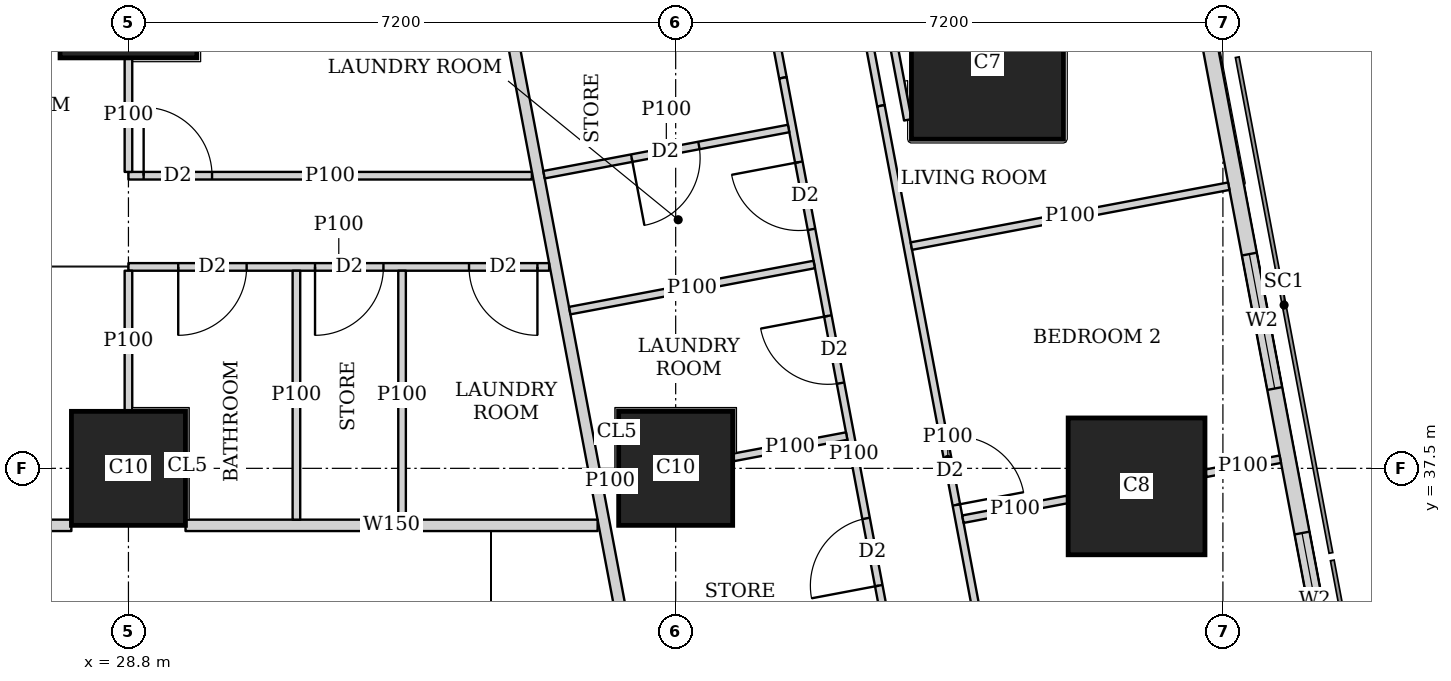
"""IFC4 building model, lengths in metres.
Left out: names, types, materials, properties, quantities, classifications, styles, units other than length and angle.
Written with IfcOpenShell. Run it as: python <this file> out.ifc"""

import sys

from ifc_helpers import new_model, si_unit, direction, frame, frame_2d, origin, origin_2d, place, context, subcontext, project, spatial, rectangle, extrude, element, fill, save


model = new_model("IFC4")
c1 = context("Model", 3, precision=1e-05, world=origin(), true_north=direction((0.0, 1.0)))
c2 = subcontext(c1, "Body", "Model", "MODEL_VIEW")
j1 = project(units=[si_unit("LENGTHUNIT", "METRE"), si_unit("PLANEANGLEUNIT", "RADIAN")], contexts=[c1])
p1 = place(None, origin())
s1 = spatial("IfcSite", under=j1, at=p1, CompositionType="ELEMENT")
p2 = place(p1, origin())
s2 = spatial("IfcBuilding", under=s1, at=p2, CompositionType="ELEMENT")
p3 = place(p2, frame((0.0, 0.0, 147.05)))
s3 = spatial("IfcBuildingStorey", under=s2, at=p3, CompositionType="ELEMENT", Elevation=147.05)
for number, where, z_axis, x_axis in (
    (1, (28.8, 37.5, 0.0), (0.0, 0.0, 1.0), (1.0, 0.0, 0.0)),
    (2, (36.0, 37.5, 0.0), (0.0, 0.0, 1.0), (1.0, 0.0, 0.0)),
):
    element("IfcColumn", number, at=place(p3, frame(where, z_axis=z_axis, x_axis=x_axis)), inside=s3, PredefinedType="COLUMN", context=c2, shape_type="SweptSolid", body=[
        extrude(rectangle(XDim=1.5, YDim=1.5, at=origin_2d()), origin(), (0.0, 0.0, 1.0), 3.75),
    ])
p4 = place(p3, frame((42.064, 37.263, 0.0), z_axis=(0.0, 0.0, 1.0), x_axis=(1.0, 0.0, 0.0)))
e3 = element("IfcColumn", 3, at=p4, inside=s3, PredefinedType="COLUMN", context=c2, shape_type="SweptSolid", body=[
    extrude(rectangle(XDim=1.8, YDim=1.8, at=origin_2d()), origin(), (0.0, 0.0, 1.0), 3.75),
])
p5 = place(p3, frame((40.102, 42.83, 0.0), z_axis=(0.0, 0.0, 1.0), x_axis=(1.0, 0.0, 0.0)))
e4 = element("IfcColumn", 4, at=p5, inside=s3, PredefinedType="COLUMN", context=c2, shape_type="SweptSolid", body=[
    extrude(rectangle(XDim=2.0, YDim=2.0, at=origin_2d()), origin(), (0.0, 0.0, 1.0), 3.75),
])
p6 = place(p3, frame((28.8, 43.8, 0.0), z_axis=(0.0, 0.0, 1.0), x_axis=(1.0, 0.0, 0.0)))
e5 = element("IfcColumn", 5, at=p6, inside=s3, PredefinedType="COLUMN", context=c2, shape_type="SweptSolid", body=[
    extrude(rectangle(XDim=1.8, YDim=1.8, at=origin_2d()), origin(), (0.0, 0.0, 1.0), 3.75),
])
p7 = place(p3, frame((50.653, 2.703, 0.0), z_axis=(0.0, 0.0, 1.0), x_axis=(-0.185612026696, 0.982623109613, 0.0)))
e6 = element("IfcWall", 6, at=p7, inside=s3, PredefinedType="SOLIDWALL", context=c2, shape_type="SweptSolid", body=[
    extrude(rectangle(XDim=41.393, YDim=0.2, at=frame_2d((20.697, 0.0))), origin(), (0.0, 0.0, 1.0), 3.5),
])
p8 = place(p7, frame((1.633, 0.0, 0.9)))
e7 = element("IfcOpeningElement", 7, at=p8, cuts=e6, PredefinedType="OPENING", context=c2, shape_type="SweptSolid", body=[
    extrude(rectangle(XDim=1.8, YDim=1.5, at=frame_2d((0.9, 0.75))), frame((0.0, 0.11, 0.0), z_axis=(0.0, -1.0, 0.0), x_axis=(1.0, 0.0, 0.0)), (0.0, 0.0, 1.0), 0.22),
])
p9 = place(p7, frame((6.032, 0.0, 0.9)))
e8 = element("IfcOpeningElement", 8, at=p9, cuts=e6, PredefinedType="OPENING", context=c2, shape_type="SweptSolid", body=[
    extrude(rectangle(XDim=1.8, YDim=1.5, at=frame_2d((0.9, 0.75))), frame((0.0, 0.11, 0.0), z_axis=(0.0, -1.0, 0.0), x_axis=(1.0, 0.0, 0.0)), (0.0, 0.0, 1.0), 0.22),
])
p10 = place(p7, frame((9.848, 0.0, 0.9)))
e9 = element("IfcOpeningElement", 9, at=p10, cuts=e6, PredefinedType="OPENING", context=c2, shape_type="SweptSolid", body=[
    extrude(rectangle(XDim=1.8, YDim=1.5, at=frame_2d((0.9, 0.75))), frame((0.0, 0.11, 0.0), z_axis=(0.0, -1.0, 0.0), x_axis=(1.0, 0.0, 0.0)), (0.0, 0.0, 1.0), 0.22),
])
p11 = place(p7, frame((13.664, 0.0, 0.9)))
e10 = element("IfcOpeningElement", 10, at=p11, cuts=e6, PredefinedType="OPENING", context=c2, shape_type="SweptSolid", body=[
    extrude(rectangle(XDim=1.8, YDim=1.5, at=frame_2d((0.9, 0.75))), frame((0.0, 0.11, 0.0), z_axis=(0.0, -1.0, 0.0), x_axis=(1.0, 0.0, 0.0)), (0.0, 0.0, 1.0), 0.22),
])
p12 = place(p7, frame((17.481, 0.0, 0.9)))
e11 = element("IfcOpeningElement", 11, at=p12, cuts=e6, PredefinedType="OPENING", context=c2, shape_type="SweptSolid", body=[
    extrude(rectangle(XDim=1.8, YDim=1.5, at=frame_2d((0.9, 0.75))), frame((0.0, 0.11, 0.0), z_axis=(0.0, -1.0, 0.0), x_axis=(1.0, 0.0, 0.0)), (0.0, 0.0, 1.0), 0.22),
])
p13 = place(p7, frame((21.297, 0.0, 0.9)))
e12 = element("IfcOpeningElement", 12, at=p13, cuts=e6, PredefinedType="OPENING", context=c2, shape_type="SweptSolid", body=[
    extrude(rectangle(XDim=1.8, YDim=1.5, at=frame_2d((0.9, 0.75))), frame((0.0, 0.11, 0.0), z_axis=(0.0, -1.0, 0.0), x_axis=(1.0, 0.0, 0.0)), (0.0, 0.0, 1.0), 0.22),
])
p14 = place(p7, frame((25.113, 0.0, 0.9)))
e13 = element("IfcOpeningElement", 13, at=p14, cuts=e6, PredefinedType="OPENING", context=c2, shape_type="SweptSolid", body=[
    extrude(rectangle(XDim=1.8, YDim=1.5, at=frame_2d((0.9, 0.75))), frame((0.0, 0.11, 0.0), z_axis=(0.0, -1.0, 0.0), x_axis=(1.0, 0.0, 0.0)), (0.0, 0.0, 1.0), 0.22),
])
p15 = place(p7, frame((28.93, 0.0, 0.9)))
e14 = element("IfcOpeningElement", 14, at=p15, cuts=e6, PredefinedType="OPENING", context=c2, shape_type="SweptSolid", body=[
    extrude(rectangle(XDim=1.8, YDim=1.5, at=frame_2d((0.9, 0.75))), frame((0.0, 0.11, 0.0), z_axis=(0.0, -1.0, 0.0), x_axis=(1.0, 0.0, 0.0)), (0.0, 0.0, 1.0), 0.22),
])
p16 = place(p7, frame((32.746, 0.0, 0.9)))
e15 = element("IfcOpeningElement", 15, at=p16, cuts=e6, PredefinedType="OPENING", context=c2, shape_type="SweptSolid", body=[
    extrude(rectangle(XDim=1.8, YDim=1.5, at=frame_2d((0.9, 0.75))), frame((0.0, 0.11, 0.0), z_axis=(0.0, -1.0, 0.0), x_axis=(1.0, 0.0, 0.0)), (0.0, 0.0, 1.0), 0.22),
])
p17 = place(p7, frame((36.481, 0.0, 0.9)))
e16 = element("IfcOpeningElement", 16, at=p17, cuts=e6, PredefinedType="OPENING", context=c2, shape_type="SweptSolid", body=[
    extrude(rectangle(XDim=1.8, YDim=1.5, at=frame_2d((0.9, 0.75))), frame((0.0, 0.11, 0.0), z_axis=(0.0, -1.0, 0.0), x_axis=(1.0, 0.0, 0.0)), (0.0, 0.0, 1.0), 0.22),
])
p18 = place(p3, frame((22.351, 36.75, 0.0), z_axis=(0.0, 0.0, 1.0), x_axis=(1.0, 0.0, 0.0)))
e17 = element("IfcWall", 17, at=p18, inside=s3, PredefinedType="SOLIDWALL", context=c2, shape_type="SweptSolid", body=[
    extrude(rectangle(XDim=5.698, YDim=0.15, at=frame_2d((2.849, 0.0))), origin(), (0.0, 0.0, 1.0), 3.5),
])
p19 = place(p18, frame((4.032, 0.0, 0.0)))
e18 = element("IfcOpeningElement", 18, at=p19, cuts=e17, PredefinedType="OPENING", context=c2, shape_type="SweptSolid", body=[
    extrude(rectangle(XDim=1.0, YDim=2.1, at=frame_2d((0.5, 1.05))), frame((0.0, 0.085, 0.0), z_axis=(0.0, -1.0, 0.0), x_axis=(1.0, 0.0, 0.0)), (0.0, 0.0, 1.0), 0.17),
])
p20 = place(p3, frame((29.551, 36.75, 0.0), z_axis=(0.0, 0.0, 1.0), x_axis=(1.0, 0.0, 0.0)))
e19 = element("IfcWall", 19, at=p20, inside=s3, PredefinedType="SOLIDWALL", context=c2, shape_type="SweptSolid", body=[
    extrude(rectangle(XDim=5.422, YDim=0.15, at=frame_2d((2.711, 0.0))), origin(), (0.0, 0.0, 1.0), 3.5),
])
p21 = place(p3, frame((33.877, 43.029, 0.0), z_axis=(0.0, 0.0, 1.0), x_axis=(0.185596841028, -0.98262597798, 0.0)))
e20 = element("IfcWall", 20, at=p21, inside=s3, PredefinedType="SOLIDWALL", context=c2, shape_type="SweptSolid", body=[
    extrude(rectangle(XDim=41.66, YDim=0.15, at=frame_2d((20.83, 0.0))), origin(), (0.0, 0.0, 1.0), 2.5),
])
p22 = place(p21, frame((12.57, 0.0, 0.0)))
e21 = element("IfcOpeningElement", 21, at=p22, cuts=e20, PredefinedType="OPENING", context=c2, shape_type="SweptSolid", body=[
    extrude(rectangle(XDim=1.0, YDim=2.1, at=frame_2d((0.5, 1.05))), frame((0.0, 0.085, 0.0), z_axis=(0.0, -1.0, 0.0), x_axis=(1.0, 0.0, 0.0)), (0.0, 0.0, 1.0), 0.17),
])
p23 = place(p21, frame((16.386, 0.0, 0.0)))
e22 = element("IfcOpeningElement", 22, at=p23, cuts=e20, PredefinedType="OPENING", context=c2, shape_type="SweptSolid", body=[
    extrude(rectangle(XDim=1.0, YDim=2.1, at=frame_2d((0.5, 1.05))), frame((0.0, 0.085, 0.0), z_axis=(0.0, -1.0, 0.0), x_axis=(1.0, 0.0, 0.0)), (0.0, 0.0, 1.0), 0.17),
])
p24 = place(p21, frame((31.166, 0.0, 0.0)))
e23 = element("IfcOpeningElement", 23, at=p24, cuts=e20, PredefinedType="OPENING", context=c2, shape_type="SweptSolid", body=[
    extrude(rectangle(XDim=1.0, YDim=2.1, at=frame_2d((0.5, 1.05))), frame((0.0, 0.085, 0.0), z_axis=(0.0, -1.0, 0.0), x_axis=(1.0, 0.0, 0.0)), (0.0, 0.0, 1.0), 0.17),
])
p25 = place(p3, frame((39.054, 42.085, 0.0), z_axis=(0.0, 0.0, 1.0), x_axis=(-0.185791584218, 0.982589175207, 0.0)))
e24 = element("IfcWall", 24, at=p25, inside=s3, PredefinedType="PARTITIONING", context=c2, shape_type="SweptSolid", body=[
    extrude(rectangle(XDim=3.628, YDim=0.1, at=frame_2d((1.814, 0.0))), origin(), (0.0, 0.0, 1.0), 2.1),
])
p26 = place(p3, frame((38.318, 44.298, 0.0), z_axis=(0.0, 0.0, 1.0), x_axis=(0.185481135188, -0.982647825261, 0.0)))
e25 = element("IfcWall", 25, at=p26, inside=s3, PredefinedType="PARTITIONING", context=c2, shape_type="SweptSolid", body=[
    extrude(rectangle(XDim=2.064, YDim=0.1, at=frame_2d((1.032, 0.0))), origin(), (0.0, 0.0, 1.0), 2.1),
])
p27 = place(p3, frame((38.701, 42.27, 0.0), z_axis=(0.0, 0.0, 1.0), x_axis=(0.185634707842, -0.982618825, 0.0)))
e26 = element("IfcWall", 26, at=p27, inside=s3, PredefinedType="PARTITIONING", context=c2, shape_type="SweptSolid", body=[
    extrude(rectangle(XDim=9.47, YDim=0.1, at=frame_2d((4.735, 0.0))), origin(), (0.0, 0.0, 1.0), 3.5),
])
p28 = place(p27, frame((8.42, 0.0, 0.0)))
e27 = element("IfcOpeningElement", 27, at=p28, cuts=e26, PredefinedType="OPENING", context=c2, shape_type="SweptSolid", body=[
    extrude(rectangle(XDim=0.9, YDim=2.1, at=frame_2d((0.45, 1.05))), frame((0.0, 0.06, 0.0), z_axis=(0.0, -1.0, 0.0), x_axis=(1.0, 0.0, 0.0)), (0.0, 0.0, 1.0), 0.12),
])
p29 = place(p27, frame((4.444, 0.0, 0.0)))
e28 = element("IfcOpeningElement", 28, at=p29, cuts=e26, PredefinedType="OPENING", context=c2, shape_type="SweptSolid", body=[
    extrude(rectangle(XDim=0.9, YDim=2.1, at=frame_2d((0.45, 1.05))), frame((0.0, 0.06, 0.0), z_axis=(0.0, -1.0, 0.0), x_axis=(1.0, 0.0, 0.0)), (0.0, 0.0, 1.0), 0.12),
])
p30 = place(p3, frame((37.028, 44.666, 0.0), z_axis=(0.0, 0.0, 1.0), x_axis=(0.185481135188, -0.982647825261, 0.0)))
e29 = element("IfcWall", 29, at=p30, inside=s3, PredefinedType="PARTITIONING", context=c2, shape_type="SweptSolid", body=[
    extrude(rectangle(XDim=2.064, YDim=0.1, at=frame_2d((1.032, 0.0))), origin(), (0.0, 0.0, 1.0), 2.1),
])
p31 = place(p3, frame((37.411, 42.638, 0.0), z_axis=(0.0, 0.0, 1.0), x_axis=(0.185485587071, -0.982646984928, 0.0)))
e30 = element("IfcWall", 30, at=p31, inside=s3, PredefinedType="PARTITIONING", context=c2, shape_type="SweptSolid", body=[
    extrude(rectangle(XDim=10.072, YDim=0.1, at=frame_2d((5.036, 0.0))), origin(), (0.0, 0.0, 1.0), 3.5),
])
p32 = place(p31, frame((8.567, 0.0, 0.0)))
e31 = element("IfcOpeningElement", 31, at=p32, cuts=e30, PredefinedType="OPENING", context=c2, shape_type="SweptSolid", body=[
    extrude(rectangle(XDim=0.9, YDim=2.1, at=frame_2d((0.45, 1.05))), frame((0.0, 0.06, 0.0), z_axis=(0.0, -1.0, 0.0), x_axis=(1.0, 0.0, 0.0)), (0.0, 0.0, 1.0), 0.12),
])
p33 = place(p31, frame((3.188, 0.0, 0.0)))
e32 = element("IfcOpeningElement", 32, at=p33, cuts=e30, PredefinedType="OPENING", context=c2, shape_type="SweptSolid", body=[
    extrude(rectangle(XDim=0.9, YDim=2.1, at=frame_2d((0.45, 1.05))), frame((0.0, 0.06, 0.0), z_axis=(0.0, -1.0, 0.0), x_axis=(1.0, 0.0, 0.0)), (0.0, 0.0, 1.0), 0.12),
])
p34 = place(p31, frame((1.129, 0.0, 0.0)))
e33 = element("IfcOpeningElement", 33, at=p34, cuts=e30, PredefinedType="OPENING", context=c2, shape_type="SweptSolid", body=[
    extrude(rectangle(XDim=0.9, YDim=2.1, at=frame_2d((0.45, 1.05))), frame((0.0, 0.06, 0.0), z_axis=(0.0, -1.0, 0.0), x_axis=(1.0, 0.0, 0.0)), (0.0, 0.0, 1.0), 0.12),
])
p35 = place(p31, frame((5.899, 0.0, 0.0)))
e34 = element("IfcOpeningElement", 34, at=p35, cuts=e30, PredefinedType="OPENING", context=c2, shape_type="SweptSolid", body=[
    extrude(rectangle(XDim=0.9, YDim=2.1, at=frame_2d((0.45, 1.05))), frame((0.0, 0.06, 0.0), z_axis=(0.0, -1.0, 0.0), x_axis=(1.0, 0.0, 0.0)), (0.0, 0.0, 1.0), 0.12),
])
p36 = place(p3, frame((43.277, 41.212, 0.0), z_axis=(0.0, 0.0, 1.0), x_axis=(-0.982665405803, -0.185387972203, 0.0)))
e35 = element("IfcWall", 35, at=p36, inside=s3, PredefinedType="PARTITIONING", context=c2, shape_type="SweptSolid", body=[
    extrude(rectangle(XDim=4.25, YDim=0.1, at=frame_2d((2.125, 0.0))), origin(), (0.0, 0.0, 1.0), 2.1),
])
p37 = place(p3, frame((43.955, 37.62, 0.0), z_axis=(0.0, 0.0, 1.0), x_axis=(-0.982666697719, -0.185381124159, 0.0)))
e36 = element("IfcWall", 36, at=p37, inside=s3, PredefinedType="PARTITIONING", context=c2, shape_type="SweptSolid", body=[
    extrude(rectangle(XDim=0.998, YDim=0.1, at=frame_2d((0.499, 0.0))), origin(), (0.0, 0.0, 1.0), 3.5),
])
p38 = place(p3, frame((41.154, 37.091, 0.0), z_axis=(0.0, 0.0, 1.0), x_axis=(-0.982586605669, -0.185805173125, 0.0)))
e37 = element("IfcWall", 37, at=p38, inside=s3, PredefinedType="PARTITIONING", context=c2, shape_type="SweptSolid", body=[
    extrude(rectangle(XDim=1.399, YDim=0.1, at=frame_2d((0.7, 0.0))), origin(), (0.0, 0.0, 1.0), 3.5),
])
p39 = place(p3, frame((37.823, 40.182, 0.0), z_axis=(0.0, 0.0, 1.0), x_axis=(-0.982664729897, -0.18539155487, 0.0)))
e38 = element("IfcWall", 38, at=p39, inside=s3, PredefinedType="PARTITIONING", context=c2, shape_type="SweptSolid", body=[
    extrude(rectangle(XDim=3.274, YDim=0.1, at=frame_2d((1.637, 0.0))), origin(), (0.0, 0.0, 1.0), 3.5),
])
p40 = place(p3, frame((38.25, 37.925, 0.0), z_axis=(0.0, 0.0, 1.0), x_axis=(-0.982676595259, -0.18532865167, 0.0)))
e39 = element("IfcWall", 39, at=p40, inside=s3, PredefinedType="PARTITIONING", context=c2, shape_type="SweptSolid", body=[
    extrude(rectangle(XDim=1.516, YDim=0.1, at=frame_2d((0.758, 0.0))), origin(), (0.0, 0.0, 1.0), 3.5),
])
p41 = place(p3, frame((35.24, 37.356, 0.0), z_axis=(0.0, 0.0, 1.0), x_axis=(-0.982819911474, -0.184567119526, 0.0)))
e40 = element("IfcWall", 40, at=p41, inside=s3, PredefinedType="PARTITIONING", context=c2, shape_type="SweptSolid", body=[
    extrude(rectangle(XDim=0.212, YDim=0.1, at=frame_2d((0.106, 0.0))), origin(), (0.0, 0.0, 1.0), 3.5),
])
p42 = place(p3, frame((37.486, 41.971, 0.0), z_axis=(0.0, 0.0, 1.0), x_axis=(-0.982620626894, -0.185625169636, 0.0)))
e41 = element("IfcWall", 41, at=p42, inside=s3, PredefinedType="PARTITIONING", context=c2, shape_type="SweptSolid", body=[
    extrude(rectangle(XDim=3.275, YDim=0.1, at=frame_2d((1.637, 0.0))), origin(), (0.0, 0.0, 1.0), 3.5),
])
p43 = place(p42, frame((1.201, 0.0, 0.0)))
e42 = element("IfcOpeningElement", 42, at=p43, cuts=e41, PredefinedType="OPENING", context=c2, shape_type="SweptSolid", body=[
    extrude(rectangle(XDim=0.9, YDim=2.1, at=frame_2d((0.45, 1.05))), frame((0.0, 0.06, 0.0), z_axis=(0.0, -1.0, 0.0), x_axis=(1.0, 0.0, 0.0)), (0.0, 0.0, 1.0), 0.12),
])
p44 = place(p3, frame((28.8, 41.35, 0.0), z_axis=(0.0, 0.0, 1.0), x_axis=(1.0, 0.0, 0.0)))
e43 = element("IfcWall", 43, at=p44, inside=s3, PredefinedType="PARTITIONING", context=c2, shape_type="SweptSolid", body=[
    extrude(rectangle(XDim=5.308, YDim=0.1, at=frame_2d((2.654, 0.0))), origin(), (0.0, 0.0, 1.0), 3.5),
])
p45 = place(p44, frame((0.2, 0.0, 0.0)))
e44 = element("IfcOpeningElement", 44, at=p45, cuts=e43, PredefinedType="OPENING", context=c2, shape_type="SweptSolid", body=[
    extrude(rectangle(XDim=0.9, YDim=2.1, at=frame_2d((0.45, 1.05))), frame((0.0, 0.06, 0.0), z_axis=(0.0, -1.0, 0.0), x_axis=(1.0, 0.0, 0.0)), (0.0, 0.0, 1.0), 0.12),
])
p46 = place(p3, frame((28.8, 40.15, 0.0), z_axis=(0.0, 0.0, 1.0), x_axis=(1.0, 0.0, 0.0)))
e45 = element("IfcWall", 45, at=p46, inside=s3, PredefinedType="PARTITIONING", context=c2, shape_type="SweptSolid", body=[
    extrude(rectangle(XDim=5.535, YDim=0.1, at=frame_2d((2.768, 0.0))), origin(), (0.0, 0.0, 1.0), 3.5),
])
p47 = place(p46, frame((0.655, 0.0, 0.0)))
e46 = element("IfcOpeningElement", 46, at=p47, cuts=e45, PredefinedType="OPENING", context=c2, shape_type="SweptSolid", body=[
    extrude(rectangle(XDim=0.9, YDim=2.1, at=frame_2d((0.45, 1.05))), frame((0.0, 0.06, 0.0), z_axis=(0.0, -1.0, 0.0), x_axis=(1.0, 0.0, 0.0)), (0.0, 0.0, 1.0), 0.12),
])
p48 = place(p46, frame((4.481, 0.0, 0.0)))
e47 = element("IfcOpeningElement", 47, at=p48, cuts=e45, PredefinedType="OPENING", context=c2, shape_type="SweptSolid", body=[
    extrude(rectangle(XDim=0.9, YDim=2.1, at=frame_2d((0.45, 1.05))), frame((0.0, 0.06, 0.0), z_axis=(0.0, -1.0, 0.0), x_axis=(1.0, 0.0, 0.0)), (0.0, 0.0, 1.0), 0.12),
])
p49 = place(p46, frame((2.455, 0.0, 0.0)))
e48 = element("IfcOpeningElement", 48, at=p49, cuts=e45, PredefinedType="OPENING", context=c2, shape_type="SweptSolid", body=[
    extrude(rectangle(XDim=0.9, YDim=2.1, at=frame_2d((0.45, 1.05))), frame((0.0, 0.06, 0.0), z_axis=(0.0, -1.0, 0.0), x_axis=(1.0, 0.0, 0.0)), (0.0, 0.0, 1.0), 0.12),
])
p50 = place(p3, frame((28.8, 41.4, 0.0), z_axis=(0.0, 0.0, 1.0), x_axis=(0.0, 1.0, 0.0)))
e49 = element("IfcWall", 49, at=p50, inside=s3, PredefinedType="PARTITIONING", context=c2, shape_type="SweptSolid", body=[
    extrude(rectangle(XDim=1.499, YDim=0.1, at=frame_2d((0.75, 0.0))), origin(), (0.0, 0.0, 1.0), 3.5),
])
p51 = place(p3, frame((28.8, 38.251, 0.0), z_axis=(0.0, 0.0, 1.0), x_axis=(0.0, 1.0, 0.0)))
e50 = element("IfcWall", 50, at=p51, inside=s3, PredefinedType="PARTITIONING", context=c2, shape_type="SweptSolid", body=[
    extrude(rectangle(XDim=1.849, YDim=0.1, at=frame_2d((0.925, 0.0))), origin(), (0.0, 0.0, 1.0), 3.5),
])
for number, where, z_axis, x_axis in (
    (51, (32.4, 36.825, 0.0), (0.0, 0.0, 1.0), (0.0, 1.0, 0.0)),
    (52, (31.01, 36.825, 0.0), (0.0, 0.0, 1.0), (0.0, 1.0, 0.0)),
):
    element("IfcWall", number, at=place(p3, frame(where, z_axis=z_axis, x_axis=x_axis)), inside=s3, PredefinedType="PARTITIONING", context=c2, shape_type="SweptSolid", body=[
        extrude(rectangle(XDim=3.275, YDim=0.1, at=frame_2d((1.638, 0.0))), origin(), (0.0, 0.0, 1.0), 3.5),
    ])
p52 = place(p16, origin())
e53 = element("IfcWindow", 53, at=p52, inside=s3, PartitioningType="SINGLE_PANEL", PredefinedType="WINDOW", context=c2, shape_type="SweptSolid", body=[
    extrude(rectangle(XDim=1.8, YDim=1.5, at=frame_2d((0.9, 0.75))), frame((0.0, 0.03, 0.0), z_axis=(0.0, -1.0, 0.0), x_axis=(1.0, 0.0, 0.0)), (0.0, 0.0, 1.0), 0.06),
])
fill(e15, e53)
p53 = place(p17, origin())
e54 = element("IfcWindow", 54, at=p53, inside=s3, PartitioningType="SINGLE_PANEL", PredefinedType="WINDOW", context=c2, shape_type="SweptSolid", body=[
    extrude(rectangle(XDim=1.8, YDim=1.5, at=frame_2d((0.9, 0.75))), frame((0.0, 0.03, 0.0), z_axis=(0.0, -1.0, 0.0), x_axis=(1.0, 0.0, 0.0)), (0.0, 0.0, 1.0), 0.06),
])
fill(e16, e54)
p54 = place(p29, origin())
e55 = element("IfcDoor", 55, at=p54, inside=s3, OperationType="SINGLE_SWING_RIGHT", PredefinedType="DOOR", context=c2, shape_type="SweptSolid", body=[
    extrude(rectangle(XDim=0.9, YDim=2.1, at=frame_2d((0.45, 1.05))), frame((0.0, 0.025, 0.0), z_axis=(0.0, -1.0, 0.0), x_axis=(1.0, 0.0, 0.0)), (0.0, 0.0, 1.0), 0.05),
])
fill(e28, e55)
p55 = place(p33, origin())
e56 = element("IfcDoor", 56, at=p55, inside=s3, OperationType="SINGLE_SWING_RIGHT", PredefinedType="DOOR", context=c2, shape_type="SweptSolid", body=[
    extrude(rectangle(XDim=0.9, YDim=2.1, at=frame_2d((0.45, 1.05))), frame((0.0, 0.025, 0.0), z_axis=(0.0, -1.0, 0.0), x_axis=(1.0, 0.0, 0.0)), (0.0, 0.0, 1.0), 0.05),
])
fill(e32, e56)
p56 = place(p34, origin())
e57 = element("IfcDoor", 57, at=p56, inside=s3, OperationType="SINGLE_SWING_RIGHT", PredefinedType="DOOR", context=c2, shape_type="SweptSolid", body=[
    extrude(rectangle(XDim=0.9, YDim=2.1, at=frame_2d((0.45, 1.05))), frame((0.0, 0.025, 0.0), z_axis=(0.0, -1.0, 0.0), x_axis=(1.0, 0.0, 0.0)), (0.0, 0.0, 1.0), 0.05),
])
fill(e33, e57)
p57 = place(p35, origin())
e58 = element("IfcDoor", 58, at=p57, inside=s3, OperationType="SINGLE_SWING_LEFT", PredefinedType="DOOR", context=c2, shape_type="SweptSolid", body=[
    extrude(rectangle(XDim=0.9, YDim=2.1, at=frame_2d((0.45, 1.05))), frame((0.0, 0.025, 0.0), z_axis=(0.0, -1.0, 0.0), x_axis=(1.0, 0.0, 0.0)), (0.0, 0.0, 1.0), 0.05),
])
fill(e34, e58)
p58 = place(p43, origin())
e59 = element("IfcDoor", 59, at=p58, inside=s3, OperationType="SINGLE_SWING_RIGHT", PredefinedType="DOOR", context=c2, shape_type="SweptSolid", body=[
    extrude(rectangle(XDim=0.9, YDim=2.1, at=frame_2d((0.45, 1.05))), frame((0.0, 0.025, 0.0), z_axis=(0.0, -1.0, 0.0), x_axis=(1.0, 0.0, 0.0)), (0.0, 0.0, 1.0), 0.05),
])
fill(e42, e59)
p59 = place(p45, origin())
e60 = element("IfcDoor", 60, at=p59, inside=s3, OperationType="SINGLE_SWING_LEFT", PredefinedType="DOOR", context=c2, shape_type="SweptSolid", body=[
    extrude(rectangle(XDim=0.9, YDim=2.1, at=frame_2d((0.45, 1.05))), frame((0.0, 0.025, 0.0), z_axis=(0.0, -1.0, 0.0), x_axis=(1.0, 0.0, 0.0)), (0.0, 0.0, 1.0), 0.05),
])
fill(e44, e60)
p60 = place(p47, origin())
e61 = element("IfcDoor", 61, at=p60, inside=s3, OperationType="SINGLE_SWING_RIGHT", PredefinedType="DOOR", context=c2, shape_type="SweptSolid", body=[
    extrude(rectangle(XDim=0.9, YDim=2.1, at=frame_2d((0.45, 1.05))), frame((0.0, 0.025, 0.0), z_axis=(0.0, -1.0, 0.0), x_axis=(1.0, 0.0, 0.0)), (0.0, 0.0, 1.0), 0.05),
])
fill(e46, e61)
p61 = place(p48, origin())
e62 = element("IfcDoor", 62, at=p61, inside=s3, OperationType="SINGLE_SWING_LEFT", PredefinedType="DOOR", context=c2, shape_type="SweptSolid", body=[
    extrude(rectangle(XDim=0.9, YDim=2.1, at=frame_2d((0.45, 1.05))), frame((0.0, 0.025, 0.0), z_axis=(0.0, -1.0, 0.0), x_axis=(1.0, 0.0, 0.0)), (0.0, 0.0, 1.0), 0.05),
])
fill(e47, e62)
p62 = place(p49, origin())
e63 = element("IfcDoor", 63, at=p62, inside=s3, OperationType="SINGLE_SWING_RIGHT", PredefinedType="DOOR", context=c2, shape_type="SweptSolid", body=[
    extrude(rectangle(XDim=0.9, YDim=2.1, at=frame_2d((0.45, 1.05))), frame((0.0, 0.025, 0.0), z_axis=(0.0, -1.0, 0.0), x_axis=(1.0, 0.0, 0.0)), (0.0, 0.0, 1.0), 0.05),
])
fill(e48, e63)
save(model, sys.argv[1])
